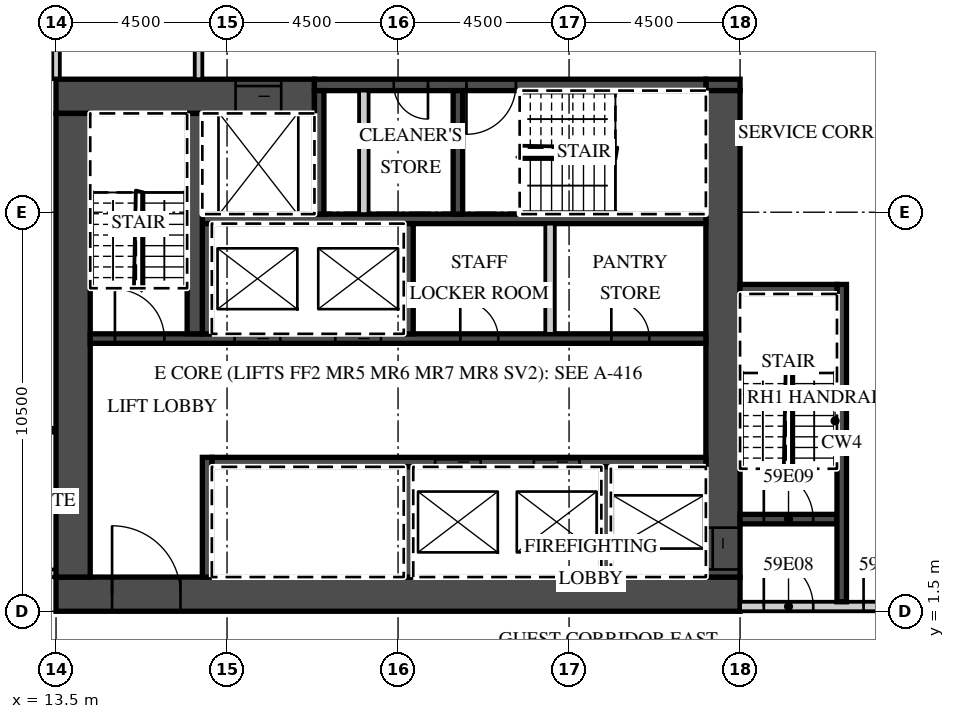
"""IFC4 building model, lengths in metres.
Left out: names, types, materials, properties, quantities, classifications, styles, units other than length and angle.
Written with IfcOpenShell. Run it as: python <this file> out.ifc"""

import sys

from ifc_helpers import new_model, si_unit, direction, frame, frame_2d, origin, place, context, subcontext, project, spatial, rectangle, extrude, element, fill, save


model = new_model("IFC4")
c1 = context("Model", 3, precision=1e-05, world=origin(), true_north=direction((0.0, 1.0)))
c2 = subcontext(c1, "Body", "Model", "MODEL_VIEW")
j1 = project(units=[si_unit("LENGTHUNIT", "METRE"), si_unit("PLANEANGLEUNIT", "RADIAN")], contexts=[c1])
p1 = place(None, origin())
s1 = spatial("IfcSite", under=j1, at=p1, CompositionType="ELEMENT")
p2 = place(p1, origin())
s2 = spatial("IfcBuilding", under=s1, at=p2, CompositionType="ELEMENT")
p3 = place(p2, frame((0.0, 0.0, 240.8)))
s3 = spatial("IfcBuildingStorey", under=s2, at=p3, CompositionType="ELEMENT", Elevation=240.8)
p4 = place(p3, frame((13.5, 15.5, 0.0), z_axis=(0.0, 0.0, 1.0), x_axis=(0.0, 1.0, 0.0)))
e1 = element("IfcWall", 1, at=p4, inside=s3, PredefinedType="PARTITIONING", context=c2, shape_type="SweptSolid", body=[
    extrude(rectangle(XDim=5.436, YDim=0.2, at=frame_2d((2.718, 0.0))), origin(), (0.0, 0.0, 1.0), 3.02),
])
p5 = place(p3, frame((-13.5, 2.5, 0.0), z_axis=(0.0, 0.0, 1.0), x_axis=(1.0, 0.0, 0.0)))
e2 = element("IfcWall", 2, at=p5, inside=s3, PredefinedType="PARTITIONING", context=c2, shape_type="SweptSolid", body=[
    extrude(rectangle(XDim=27.0, YDim=0.2, at=frame_2d((13.5, 0.0))), origin(), (0.0, 0.0, 1.0), 3.02),
])
p6 = place(p5, frame((2.925, 0.0, 0.0)))
e3 = element("IfcOpeningElement", 3, at=p6, cuts=e2, PredefinedType="OPENING", context=c2, shape_type="SweptSolid", body=[
    extrude(rectangle(XDim=1.0, YDim=2.1, at=frame_2d((0.5, 1.05))), frame((0.0, 0.11, 0.0), z_axis=(0.0, -1.0, 0.0), x_axis=(1.0, 0.0, 0.0)), (0.0, 0.0, 1.0), 0.22),
])
p7 = place(p5, frame((7.45, 0.0, 0.0)))
e4 = element("IfcOpeningElement", 4, at=p7, cuts=e2, PredefinedType="OPENING", context=c2, shape_type="SweptSolid", body=[
    extrude(rectangle(XDim=1.0, YDim=2.1, at=frame_2d((0.5, 1.05))), frame((0.0, 0.11, 0.0), z_axis=(0.0, -1.0, 0.0), x_axis=(1.0, 0.0, 0.0)), (0.0, 0.0, 1.0), 0.22),
])
p8 = place(p5, frame((11.925, 0.0, 0.0)))
e5 = element("IfcOpeningElement", 5, at=p8, cuts=e2, PredefinedType="OPENING", context=c2, shape_type="SweptSolid", body=[
    extrude(rectangle(XDim=1.0, YDim=2.1, at=frame_2d((0.5, 1.05))), frame((0.0, 0.11, 0.0), z_axis=(0.0, -1.0, 0.0), x_axis=(1.0, 0.0, 0.0)), (0.0, 0.0, 1.0), 0.22),
])
p9 = place(p5, frame((16.45, 0.0, 0.0)))
e6 = element("IfcOpeningElement", 6, at=p9, cuts=e2, PredefinedType="OPENING", context=c2, shape_type="SweptSolid", body=[
    extrude(rectangle(XDim=1.0, YDim=2.1, at=frame_2d((0.5, 1.05))), frame((0.0, 0.11, 0.0), z_axis=(0.0, -1.0, 0.0), x_axis=(1.0, 0.0, 0.0)), (0.0, 0.0, 1.0), 0.22),
])
p10 = place(p5, frame((18.55, 0.0, 0.0)))
e7 = element("IfcOpeningElement", 7, at=p10, cuts=e2, PredefinedType="OPENING", context=c2, shape_type="SweptSolid", body=[
    extrude(rectangle(XDim=1.0, YDim=2.1, at=frame_2d((0.5, 1.05))), frame((0.0, 0.11, 0.0), z_axis=(0.0, -1.0, 0.0), x_axis=(1.0, 0.0, 0.0)), (0.0, 0.0, 1.0), 0.22),
])
p11 = place(p5, frame((23.075, 0.0, 0.0)))
e8 = element("IfcOpeningElement", 8, at=p11, cuts=e2, PredefinedType="OPENING", context=c2, shape_type="SweptSolid", body=[
    extrude(rectangle(XDim=1.0, YDim=2.1, at=frame_2d((0.5, 1.05))), frame((0.0, 0.11, 0.0), z_axis=(0.0, -1.0, 0.0), x_axis=(1.0, 0.0, 0.0)), (0.0, 0.0, 1.0), 0.22),
])
p12 = place(p3, frame((13.5, 1.95, 0.0), z_axis=(0.0, 0.0, 1.0), x_axis=(1.0, 0.0, 0.0)))
e9 = element("IfcWall", 9, at=p12, inside=s3, PredefinedType="SHEAR", context=c2, shape_type="SweptSolid", body=[
    extrude(rectangle(XDim=18.0, YDim=0.9, at=frame_2d((9.0, 0.0))), origin(), (0.0, 0.0, 1.0), 3.02),
])
p13 = place(p12, frame((1.475, 0.0, 0.0)))
e10 = element("IfcOpeningElement", 10, at=p13, cuts=e9, PredefinedType="OPENING", context=c2, shape_type="SweptSolid", body=[
    extrude(rectangle(XDim=1.8, YDim=2.1, at=frame_2d((0.9, 1.05))), frame((0.0, 0.46, 0.0), z_axis=(0.0, -1.0, 0.0), x_axis=(1.0, 0.0, 0.0)), (0.0, 0.0, 1.0), 0.92),
])
p14 = place(p3, frame((13.5, 15.05, 0.0), z_axis=(0.0, 0.0, 1.0), x_axis=(1.0, 0.0, 0.0)))
e11 = element("IfcWall", 11, at=p14, inside=s3, PredefinedType="SHEAR", context=c2, shape_type="SweptSolid", body=[
    extrude(rectangle(XDim=6.8, YDim=0.9, at=frame_2d((3.4, 0.0))), origin(), (0.0, 0.0, 1.0), 3.02),
])
p15 = place(p14, frame((4.725, 0.0, 0.0)))
e12 = element("IfcOpeningElement", 12, at=p15, cuts=e11, PredefinedType="OPENING", context=c2, shape_type="SweptSolid", body=[
    extrude(rectangle(XDim=1.2, YDim=2.1, at=frame_2d((0.6, 1.05))), frame((0.0, 0.46, 0.0), z_axis=(0.0, -1.0, 0.0), x_axis=(1.0, 0.0, 0.0)), (0.0, 0.0, 1.0), 0.92),
])
p16 = place(p3, frame((30.6, 15.35, 0.0), z_axis=(0.0, 0.0, 1.0), x_axis=(1.0, 0.0, 0.0)))
e13 = element("IfcWall", 13, at=p16, inside=s3, PredefinedType="SHEAR", context=c2, shape_type="SweptSolid", body=[
    extrude(rectangle(XDim=0.9, YDim=0.3, at=frame_2d((0.45, 0.0))), origin(), (0.0, 0.0, 1.0), 3.02),
])
p17 = place(p3, frame((20.3, 15.35, 0.0), z_axis=(0.0, 0.0, 1.0), x_axis=(1.0, 0.0, 0.0)))
e14 = element("IfcWall", 14, at=p17, inside=s3, PredefinedType="SHEAR", context=c2, shape_type="SweptSolid", body=[
    extrude(rectangle(XDim=10.3, YDim=0.3, at=frame_2d((5.15, 0.0))), origin(), (0.0, 0.0, 1.0), 3.02),
])
p18 = place(p17, frame((4.0, 0.0, 0.0)))
e15 = element("IfcOpeningElement", 15, at=p18, cuts=e14, PredefinedType="OPENING", context=c2, shape_type="SweptSolid", body=[
    extrude(rectangle(XDim=1.3, YDim=2.1, at=frame_2d((0.65, 1.05))), frame((0.0, 0.16, 0.0), z_axis=(0.0, -1.0, 0.0), x_axis=(1.0, 0.0, 0.0)), (0.0, 0.0, 1.0), 0.32),
])
p19 = place(p17, frame((2.087, 0.0, 0.0)))
e16 = element("IfcOpeningElement", 16, at=p19, cuts=e14, PredefinedType="OPENING", context=c2, shape_type="SweptSolid", body=[
    extrude(rectangle(XDim=0.9, YDim=2.1, at=frame_2d((0.45, 1.05))), frame((0.0, 0.16, 0.0), z_axis=(0.0, -1.0, 0.0), x_axis=(1.0, 0.0, 0.0)), (0.0, 0.0, 1.0), 0.32),
])
p20 = place(p3, frame((31.05, 2.4, 0.0), z_axis=(0.0, 0.0, 1.0), x_axis=(0.0, 1.0, 0.0)))
e17 = element("IfcWall", 17, at=p20, inside=s3, PredefinedType="SHEAR", context=c2, shape_type="SweptSolid", body=[
    extrude(rectangle(XDim=12.8, YDim=0.9, at=frame_2d((6.4, 0.0))), origin(), (0.0, 0.0, 1.0), 3.02),
])
p21 = place(p20, frame((0.2, 0.0, 0.0)))
e18 = element("IfcOpeningElement", 18, at=p21, cuts=e17, PredefinedType="OPENING", context=c2, shape_type="SweptSolid", body=[
    extrude(rectangle(XDim=1.1, YDim=2.1, at=frame_2d((0.55, 1.05))), frame((0.0, 0.46, 0.0), z_axis=(0.0, -1.0, 0.0), x_axis=(1.0, 0.0, 0.0)), (0.0, 0.0, 1.0), 0.92),
])
p22 = place(p3, frame((13.95, 2.4, 0.0), z_axis=(0.0, 0.0, 1.0), x_axis=(0.0, 1.0, 0.0)))
e19 = element("IfcWall", 19, at=p22, inside=s3, PredefinedType="SHEAR", context=c2, shape_type="SweptSolid", body=[
    extrude(rectangle(XDim=12.2, YDim=0.9, at=frame_2d((6.1, 0.0))), origin(), (0.0, 0.0, 1.0), 3.02),
])
p23 = place(p3, frame((17.6, 5.425, 0.0), z_axis=(0.0, 0.0, 1.0), x_axis=(1.0, 0.0, 0.0)))
e20 = element("IfcWall", 20, at=p23, inside=s3, PredefinedType="SHEAR", context=c2, shape_type="SweptSolid", body=[
    extrude(rectangle(XDim=13.0, YDim=0.25, at=frame_2d((6.5, 0.0))), origin(), (0.0, 0.0, 1.0), 3.02),
])
p24 = place(p23, frame((8.475, 0.0, 0.0)))
e21 = element("IfcOpeningElement", 21, at=p24, cuts=e20, PredefinedType="OPENING", context=c2, shape_type="SweptSolid", body=[
    extrude(rectangle(XDim=1.2, YDim=2.1, at=frame_2d((0.6, 1.05))), frame((0.0, 0.135, 0.0), z_axis=(0.0, -1.0, 0.0), x_axis=(1.0, 0.0, 0.0)), (0.0, 0.0, 1.0), 0.27),
])
p25 = place(p23, frame((5.875, 0.0, 0.0)))
e22 = element("IfcOpeningElement", 22, at=p25, cuts=e20, PredefinedType="OPENING", context=c2, shape_type="SweptSolid", body=[
    extrude(rectangle(XDim=1.2, YDim=2.1, at=frame_2d((0.6, 1.05))), frame((0.0, 0.135, 0.0), z_axis=(0.0, -1.0, 0.0), x_axis=(1.0, 0.0, 0.0)), (0.0, 0.0, 1.0), 0.27),
])
p26 = place(p3, frame((17.475, 2.4, 0.0), z_axis=(0.0, 0.0, 1.0), x_axis=(0.0, 1.0, 0.0)))
e23 = element("IfcWall", 23, at=p26, inside=s3, PredefinedType="SHEAR", context=c2, shape_type="SweptSolid", body=[
    extrude(rectangle(XDim=3.15, YDim=0.25, at=frame_2d((1.575, 0.0))), origin(), (0.0, 0.0, 1.0), 3.02),
])
for number, where, z_axis, x_axis in (
    (24, (27.975, 2.4, 0.0), (0.0, 0.0, 1.0), (0.0, 1.0, 0.0)),
    (25, (22.775, 2.4, 0.0), (0.0, 0.0, 1.0), (0.0, 1.0, 0.0)),
):
    element("IfcWall", number, at=place(p3, frame(where, z_axis=z_axis, x_axis=x_axis)), inside=s3, PredefinedType="SHEAR", context=c2, shape_type="SweptSolid", body=[
        extrude(rectangle(XDim=2.9, YDim=0.25, at=frame_2d((1.45, 0.0))), origin(), (0.0, 0.0, 1.0), 3.02),
    ])
p27 = place(p3, frame((14.4, 8.675, 0.0), z_axis=(0.0, 0.0, 1.0), x_axis=(1.0, 0.0, 0.0)))
e26 = element("IfcWall", 26, at=p27, inside=s3, PredefinedType="SHEAR", context=c2, shape_type="SweptSolid", body=[
    extrude(rectangle(XDim=16.2, YDim=0.25, at=frame_2d((8.1, 0.0))), origin(), (0.0, 0.0, 1.0), 3.02),
])
p28 = place(p27, frame((6.45, 0.0, 0.0)))
e27 = element("IfcOpeningElement", 27, at=p28, cuts=e26, PredefinedType="OPENING", context=c2, shape_type="SweptSolid", body=[
    extrude(rectangle(XDim=1.2, YDim=2.1, at=frame_2d((0.6, 1.05))), frame((0.0, 0.135, 0.0), z_axis=(0.0, -1.0, 0.0), x_axis=(1.0, 0.0, 0.0)), (0.0, 0.0, 1.0), 0.27),
])
p29 = place(p27, frame((3.8, 0.0, 0.0)))
e28 = element("IfcOpeningElement", 28, at=p29, cuts=e26, PredefinedType="OPENING", context=c2, shape_type="SweptSolid", body=[
    extrude(rectangle(XDim=1.2, YDim=2.1, at=frame_2d((0.6, 1.05))), frame((0.0, 0.135, 0.0), z_axis=(0.0, -1.0, 0.0), x_axis=(1.0, 0.0, 0.0)), (0.0, 0.0, 1.0), 0.27),
])
p30 = place(p27, frame((0.65, 0.0, 0.0)))
e29 = element("IfcOpeningElement", 29, at=p30, cuts=e26, PredefinedType="OPENING", context=c2, shape_type="SweptSolid", body=[
    extrude(rectangle(XDim=1.3, YDim=2.1, at=frame_2d((0.65, 1.05))), frame((0.0, 0.135, 0.0), z_axis=(0.0, -1.0, 0.0), x_axis=(1.0, 0.0, 0.0)), (0.0, 0.0, 1.0), 0.27),
])
p31 = place(p27, frame((13.712, 0.0, 0.0)))
e30 = element("IfcOpeningElement", 30, at=p31, cuts=e26, PredefinedType="OPENING", context=c2, shape_type="SweptSolid", body=[
    extrude(rectangle(XDim=1.0, YDim=2.1, at=frame_2d((0.5, 1.05))), frame((0.0, 0.135, 0.0), z_axis=(0.0, -1.0, 0.0), x_axis=(1.0, 0.0, 0.0)), (0.0, 0.0, 1.0), 0.27),
])
p32 = place(p27, frame((9.738, 0.0, 0.0)))
e31 = element("IfcOpeningElement", 31, at=p32, cuts=e26, PredefinedType="OPENING", context=c2, shape_type="SweptSolid", body=[
    extrude(rectangle(XDim=1.0, YDim=2.1, at=frame_2d((0.5, 1.05))), frame((0.0, 0.135, 0.0), z_axis=(0.0, -1.0, 0.0), x_axis=(1.0, 0.0, 0.0)), (0.0, 0.0, 1.0), 0.27),
])
p33 = place(p3, frame((17.35, 11.825, 0.0), z_axis=(0.0, 0.0, 1.0), x_axis=(1.0, 0.0, 0.0)))
e32 = element("IfcWall", 32, at=p33, inside=s3, PredefinedType="SHEAR", context=c2, shape_type="SweptSolid", body=[
    extrude(rectangle(XDim=13.25, YDim=0.25, at=frame_2d((6.625, 0.0))), origin(), (0.0, 0.0, 1.0), 3.02),
])
for number, where, z_axis, x_axis in (
    (33, (17.475, 8.8, 0.0), (0.0, 0.0, 1.0), (0.0, 1.0, 0.0)),
    (34, (22.775, 8.8, 0.0), (0.0, 0.0, 1.0), (0.0, 1.0, 0.0)),
):
    element("IfcWall", number, at=place(p3, frame(where, z_axis=z_axis, x_axis=x_axis)), inside=s3, PredefinedType="SHEAR", context=c2, shape_type="SweptSolid", body=[
        extrude(rectangle(XDim=2.9, YDim=0.25, at=frame_2d((1.45, 0.0))), origin(), (0.0, 0.0, 1.0), 3.02),
    ])
p34 = place(p3, frame((26.5, 8.8, 0.0), z_axis=(0.0, 0.0, 1.0), x_axis=(0.0, 1.0, 0.0)))
e35 = element("IfcWall", 35, at=p34, inside=s3, PredefinedType="PARTITIONING", context=c2, shape_type="SweptSolid", body=[
    extrude(rectangle(XDim=2.9, YDim=0.25, at=frame_2d((1.45, 0.0))), origin(), (0.0, 0.0, 1.0), 3.02),
])
p35 = place(p3, frame((17.15, 8.8, 0.0), z_axis=(0.0, 0.0, 1.0), x_axis=(0.0, 1.0, 0.0)))
e36 = element("IfcWall", 36, at=p35, inside=s3, PredefinedType="SHEAR", context=c2, shape_type="SweptSolid", body=[
    extrude(rectangle(XDim=5.8, YDim=0.4, at=frame_2d((2.9, 0.0))), origin(), (0.0, 0.0, 1.0), 3.02),
])
for number, where, z_axis, x_axis in (
    (37, (20.425, 11.95, 0.0), (0.0, 0.0, 1.0), (0.0, 1.0, 0.0)),
    (38, (24.075, 11.95, 0.0), (0.0, 0.0, 1.0), (0.0, 1.0, 0.0)),
):
    element("IfcWall", number, at=place(p3, frame(where, z_axis=z_axis, x_axis=x_axis)), inside=s3, PredefinedType="SHEAR", context=c2, shape_type="SweptSolid", body=[
        extrude(rectangle(XDim=3.25, YDim=0.25, at=frame_2d((1.625, 0.0))), origin(), (0.0, 0.0, 1.0), 3.02),
    ])
p36 = place(p3, frame((21.6, 11.95, 0.0), z_axis=(0.0, 0.0, 1.0), x_axis=(0.0, 1.0, 0.0)))
e39 = element("IfcWall", 39, at=p36, inside=s3, PredefinedType="PARTITIONING", context=c2, shape_type="SweptSolid", body=[
    extrude(rectangle(XDim=3.25, YDim=0.25, at=frame_2d((1.625, 0.0))), origin(), (0.0, 0.0, 1.0), 3.02),
])
p37 = place(p3, frame((31.5, 1.625, 0.0), z_axis=(0.0, 0.0, 1.0), x_axis=(1.0, 0.0, 0.0)))
e40 = element("IfcWall", 40, at=p37, inside=s3, PredefinedType="PARTITIONING", context=c2, shape_type="SweptSolid", body=[
    extrude(rectangle(XDim=11.04, YDim=0.25, at=frame_2d((5.52, 0.0))), origin(), (0.0, 0.0, 1.0), 3.02),
])
p38 = place(p37, frame((0.625, 0.0, 0.0)))
e41 = element("IfcOpeningElement", 41, at=p38, cuts=e40, PredefinedType="OPENING", context=c2, shape_type="SweptSolid", body=[
    extrude(rectangle(XDim=1.3, YDim=2.1, at=frame_2d((0.65, 1.05))), frame((0.0, 0.135, 0.0), z_axis=(0.0, -1.0, 0.0), x_axis=(1.0, 0.0, 0.0)), (0.0, 0.0, 1.0), 0.27),
])
p39 = place(p37, frame((3.25, 0.0, 0.0)))
e42 = element("IfcOpeningElement", 42, at=p39, cuts=e40, PredefinedType="OPENING", context=c2, shape_type="SweptSolid", body=[
    extrude(rectangle(XDim=1.1, YDim=2.1, at=frame_2d((0.55, 1.05))), frame((0.0, 0.135, 0.0), z_axis=(0.0, -1.0, 0.0), x_axis=(1.0, 0.0, 0.0)), (0.0, 0.0, 1.0), 0.27),
])
p40 = place(p3, frame((31.5, 3.925, 0.0), z_axis=(0.0, 0.0, 1.0), x_axis=(1.0, 0.0, 0.0)))
e43 = element("IfcWall", 43, at=p40, inside=s3, PredefinedType="SHEAR", context=c2, shape_type="SweptSolid", body=[
    extrude(rectangle(XDim=2.55, YDim=0.25, at=frame_2d((1.275, 0.0))), origin(), (0.0, 0.0, 1.0), 3.02),
])
p41 = place(p40, frame((0.625, 0.0, 0.0)))
e44 = element("IfcOpeningElement", 44, at=p41, cuts=e43, PredefinedType="OPENING", context=c2, shape_type="SweptSolid", body=[
    extrude(rectangle(XDim=1.3, YDim=2.1, at=frame_2d((0.65, 1.05))), frame((0.0, 0.135, 0.0), z_axis=(0.0, -1.0, 0.0), x_axis=(1.0, 0.0, 0.0)), (0.0, 0.0, 1.0), 0.27),
])
p42 = place(p3, frame((34.175, 1.75, 0.0), z_axis=(0.0, 0.0, 1.0), x_axis=(0.0, 1.0, 0.0)))
e45 = element("IfcWall", 45, at=p42, inside=s3, PredefinedType="SHEAR", context=c2, shape_type="SweptSolid", body=[
    extrude(rectangle(XDim=8.35, YDim=0.25, at=frame_2d((4.175, 0.0))), origin(), (0.0, 0.0, 1.0), 3.02),
])
p43 = place(p3, frame((31.5, 9.975, 0.0), z_axis=(0.0, 0.0, 1.0), x_axis=(1.0, 0.0, 0.0)))
e46 = element("IfcWall", 46, at=p43, inside=s3, PredefinedType="SHEAR", context=c2, shape_type="SweptSolid", body=[
    extrude(rectangle(XDim=2.55, YDim=0.25, at=frame_2d((1.275, 0.0))), origin(), (0.0, 0.0, 1.0), 3.02),
])
p44 = place(p3, frame((17.25, 15.5, 0.0), z_axis=(0.0, 0.0, 1.0), x_axis=(0.0, 1.0, 0.0)))
e47 = element("IfcWall", 47, at=p44, inside=s3, PredefinedType="PARTITIONING", context=c2, shape_type="SweptSolid", body=[
    extrude(rectangle(XDim=2.2, YDim=0.2, at=frame_2d((1.1, 0.0))), origin(), (0.0, 0.0, 1.0), 3.02),
])
p45 = place(p28, origin())
e48 = element("IfcDoor", 48, at=p45, inside=s3, OperationType="SLIDING_TO_LEFT", PredefinedType="DOOR", context=c2, shape_type="SweptSolid", body=[
    extrude(rectangle(XDim=1.2, YDim=2.1, at=frame_2d((0.6, 1.05))), frame((0.0, 0.025, 0.0), z_axis=(0.0, -1.0, 0.0), x_axis=(1.0, 0.0, 0.0)), (0.0, 0.0, 1.0), 0.05),
])
fill(e27, e48)
p46 = place(p29, origin())
e49 = element("IfcDoor", 49, at=p46, inside=s3, OperationType="SLIDING_TO_RIGHT", PredefinedType="DOOR", context=c2, shape_type="SweptSolid", body=[
    extrude(rectangle(XDim=1.2, YDim=2.1, at=frame_2d((0.6, 1.05))), frame((0.0, 0.025, 0.0), z_axis=(0.0, -1.0, 0.0), x_axis=(1.0, 0.0, 0.0)), (0.0, 0.0, 1.0), 0.05),
])
fill(e28, e49)
p47 = place(p24, origin())
e50 = element("IfcDoor", 50, at=p47, inside=s3, OperationType="SLIDING_TO_LEFT", PredefinedType="DOOR", context=c2, shape_type="SweptSolid", body=[
    extrude(rectangle(XDim=1.2, YDim=2.1, at=frame_2d((0.6, 1.05))), frame((0.0, 0.025, 0.0), z_axis=(0.0, -1.0, 0.0), x_axis=(1.0, 0.0, 0.0)), (0.0, 0.0, 1.0), 0.05),
])
fill(e21, e50)
p48 = place(p25, origin())
e51 = element("IfcDoor", 51, at=p48, inside=s3, OperationType="SLIDING_TO_RIGHT", PredefinedType="DOOR", context=c2, shape_type="SweptSolid", body=[
    extrude(rectangle(XDim=1.2, YDim=2.1, at=frame_2d((0.6, 1.05))), frame((0.0, 0.025, 0.0), z_axis=(0.0, -1.0, 0.0), x_axis=(1.0, 0.0, 0.0)), (0.0, 0.0, 1.0), 0.05),
])
fill(e22, e51)
p49 = place(p15, origin())
e52 = element("IfcDoor", 52, at=p49, inside=s3, OperationType="SLIDING_TO_LEFT", PredefinedType="DOOR", context=c2, shape_type="SweptSolid", body=[
    extrude(rectangle(XDim=1.2, YDim=2.1, at=frame_2d((0.6, 1.05))), frame((0.0, 0.025, 0.0), z_axis=(0.0, -1.0, 0.0), x_axis=(1.0, 0.0, 0.0)), (0.0, 0.0, 1.0), 0.05),
])
fill(e12, e52)
p50 = place(p21, origin())
e53 = element("IfcDoor", 53, at=p50, inside=s3, OperationType="SLIDING_TO_LEFT", PredefinedType="DOOR", context=c2, shape_type="SweptSolid", body=[
    extrude(rectangle(XDim=1.1, YDim=2.1, at=frame_2d((0.55, 1.05))), frame((0.0, 0.025, 0.0), z_axis=(0.0, -1.0, 0.0), x_axis=(1.0, 0.0, 0.0)), (0.0, 0.0, 1.0), 0.05),
])
fill(e18, e53)
p51 = place(p13, origin())
e54 = element("IfcDoor", 54, at=p51, inside=s3, OperationType="DOUBLE_DOOR_DOUBLE_SWING", PredefinedType="DOOR", context=c2, shape_type="SweptSolid", body=[
    extrude(rectangle(XDim=1.8, YDim=2.1, at=frame_2d((0.9, 1.05))), frame((0.0, 0.025, 0.0), z_axis=(0.0, -1.0, 0.0), x_axis=(1.0, 0.0, 0.0)), (0.0, 0.0, 1.0), 0.05),
])
fill(e10, e54)
p52 = place(p38, origin())
e55 = element("IfcDoor", 55, at=p52, inside=s3, OperationType="SINGLE_SWING_LEFT", PredefinedType="DOOR", context=c2, shape_type="SweptSolid", body=[
    extrude(rectangle(XDim=1.3, YDim=2.1, at=frame_2d((0.65, 1.05))), frame((0.0, 0.025, 0.0), z_axis=(0.0, -1.0, 0.0), x_axis=(1.0, 0.0, 0.0)), (0.0, 0.0, 1.0), 0.05),
])
fill(e41, e55)
p53 = place(p41, origin())
e56 = element("IfcDoor", 56, at=p53, inside=s3, OperationType="SINGLE_SWING_LEFT", PredefinedType="DOOR", context=c2, shape_type="SweptSolid", body=[
    extrude(rectangle(XDim=1.3, YDim=2.1, at=frame_2d((0.65, 1.05))), frame((0.0, 0.025, 0.0), z_axis=(0.0, -1.0, 0.0), x_axis=(1.0, 0.0, 0.0)), (0.0, 0.0, 1.0), 0.05),
])
fill(e44, e56)
p54 = place(p39, origin())
e57 = element("IfcDoor", 57, at=p54, inside=s3, OperationType="SINGLE_SWING_LEFT", PredefinedType="DOOR", context=c2, shape_type="SweptSolid", body=[
    extrude(rectangle(XDim=1.1, YDim=2.1, at=frame_2d((0.55, 1.05))), frame((0.0, 0.025, 0.0), z_axis=(0.0, -1.0, 0.0), x_axis=(1.0, 0.0, 0.0)), (0.0, 0.0, 1.0), 0.05),
])
fill(e42, e57)
p55 = place(p30, origin())
e58 = element("IfcDoor", 58, at=p55, inside=s3, OperationType="SINGLE_SWING_LEFT", PredefinedType="DOOR", context=c2, shape_type="SweptSolid", body=[
    extrude(rectangle(XDim=1.3, YDim=2.1, at=frame_2d((0.65, 1.05))), frame((0.0, 0.025, 0.0), z_axis=(0.0, -1.0, 0.0), x_axis=(1.0, 0.0, 0.0)), (0.0, 0.0, 1.0), 0.05),
])
fill(e29, e58)
p56 = place(p18, origin())
e59 = element("IfcDoor", 59, at=p56, inside=s3, OperationType="SINGLE_SWING_LEFT", PredefinedType="DOOR", context=c2, shape_type="SweptSolid", body=[
    extrude(rectangle(XDim=1.3, YDim=2.1, at=frame_2d((0.65, 1.05))), frame((0.0, 0.025, 0.0), z_axis=(0.0, -1.0, 0.0), x_axis=(1.0, 0.0, 0.0)), (0.0, 0.0, 1.0), 0.05),
])
fill(e15, e59)
p57 = place(p19, origin())
e60 = element("IfcDoor", 60, at=p57, inside=s3, OperationType="SINGLE_SWING_RIGHT", PredefinedType="DOOR", context=c2, shape_type="SweptSolid", body=[
    extrude(rectangle(XDim=0.9, YDim=2.1, at=frame_2d((0.45, 1.05))), frame((0.0, 0.025, 0.0), z_axis=(0.0, -1.0, 0.0), x_axis=(1.0, 0.0, 0.0)), (0.0, 0.0, 1.0), 0.05),
])
fill(e16, e60)
p58 = place(p31, origin())
e61 = element("IfcDoor", 61, at=p58, inside=s3, OperationType="SINGLE_SWING_LEFT", PredefinedType="DOOR", context=c2, shape_type="SweptSolid", body=[
    extrude(rectangle(XDim=1.0, YDim=2.1, at=frame_2d((0.5, 1.05))), frame((0.0, 0.025, 0.0), z_axis=(0.0, -1.0, 0.0), x_axis=(1.0, 0.0, 0.0)), (0.0, 0.0, 1.0), 0.05),
])
fill(e30, e61)
p59 = place(p32, origin())
e62 = element("IfcDoor", 62, at=p59, inside=s3, OperationType="SINGLE_SWING_LEFT", PredefinedType="DOOR", context=c2, shape_type="SweptSolid", body=[
    extrude(rectangle(XDim=1.0, YDim=2.1, at=frame_2d((0.5, 1.05))), frame((0.0, 0.025, 0.0), z_axis=(0.0, -1.0, 0.0), x_axis=(1.0, 0.0, 0.0)), (0.0, 0.0, 1.0), 0.05),
])
fill(e31, e62)
save(model, sys.argv[1])
